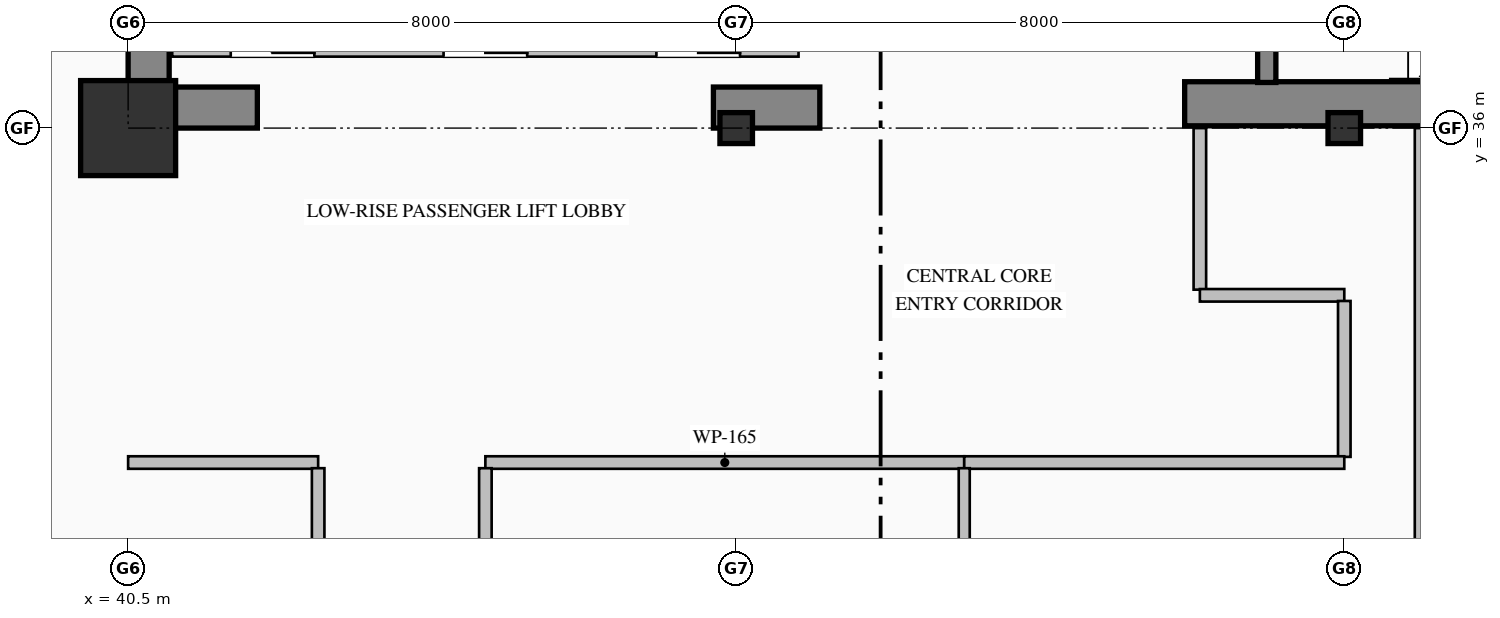
"""IFC4 building model, lengths in metres.
Left out: names, types, materials, properties, quantities, classifications, styles, units other than length and angle.
Written with IfcOpenShell. Run it as: python <this file> out.ifc"""

import sys

from ifc_helpers import new_model, si_unit, direction, frame, frame_2d, origin, origin_2d, place, context, subcontext, project, spatial, rectangle, hollow_rectangle, i_section, extrude, element, save


model = new_model("IFC4")
c1 = context("Model", 3, precision=1e-05, world=origin(), true_north=direction((0.0, 1.0)))
c2 = subcontext(c1, "Body", "Model", "MODEL_VIEW")
j1 = project(units=[si_unit("LENGTHUNIT", "METRE"), si_unit("PLANEANGLEUNIT", "RADIAN")], contexts=[c1])
p1 = place(None, origin())
s1 = spatial("IfcSite", under=j1, at=p1, CompositionType="ELEMENT")
p2 = place(p1, origin())
s2 = spatial("IfcBuilding", under=s1, at=p2, CompositionType="ELEMENT")
p3 = place(p2, frame((0.0, 0.0, 76.2)))
s3 = spatial("IfcBuildingStorey", under=s2, at=p3, CompositionType="ELEMENT", Elevation=76.2)
p4 = place(p3, frame((40.77, 36.54, 0.0), z_axis=(0.0, 0.0, 1.0), x_axis=(0.0, 1.0, 0.0)))
e1 = element("IfcWall", 1, at=p4, inside=s3, PredefinedType="SHEAR", context=c2, shape_type="SweptSolid", body=[
    extrude(rectangle(XDim=7.86, YDim=0.54, at=frame_2d((3.93, 0.0))), origin(), (0.0, 0.0, 1.0), 3.75),
])
p5 = place(p3, frame((40.5, 36.27, 0.0), z_axis=(0.0, 0.0, 1.0), x_axis=(1.0, 0.0, 0.0)))
e2 = element("IfcWall", 2, at=p5, inside=s3, PredefinedType="SHEAR", context=c2, shape_type="SweptSolid", body=[
    extrude(rectangle(XDim=1.7, YDim=0.54, at=frame_2d((0.85, 0.0))), origin(), (0.0, 0.0, 1.0), 3.75),
])
p6 = place(p3, frame((48.2, 36.27, 0.0), z_axis=(0.0, 0.0, 1.0), x_axis=(1.0, 0.0, 0.0)))
e3 = element("IfcWall", 3, at=p6, inside=s3, PredefinedType="SHEAR", context=c2, shape_type="SweptSolid", body=[
    extrude(rectangle(XDim=1.4, YDim=0.54, at=frame_2d((0.7, 0.0))), origin(), (0.0, 0.0, 1.0), 3.75),
])
p7 = place(p3, frame((54.4, 36.32, 0.0), z_axis=(0.0, 0.0, 1.0), x_axis=(1.0, 0.0, 0.0)))
e4 = element("IfcWall", 4, at=p7, inside=s3, PredefinedType="SHEAR", context=c2, shape_type="SweptSolid", body=[
    extrude(rectangle(XDim=9.6, YDim=0.58, at=frame_2d((4.8, 0.0))), origin(), (0.0, 0.0, 1.0), 4.0),
])
p8 = place(p3, frame((40.5, 36.0, 0.0), z_axis=(0.0, 0.0, 1.0), x_axis=(1.0, 0.0, 0.0)))
e5 = element("IfcColumn", 5, at=p8, inside=s3, PredefinedType="COLUMN", context=c2, shape_type="SweptSolid", body=[
    extrude(hollow_rectangle(XDim=1.25, YDim=1.25, WallThickness=0.045, at=origin_2d()), origin(), (0.0, 0.0, 1.0), 4.0),
])
for number, where, z_axis, x_axis in (
    (6, (48.5, 36.0, 0.0), (0.0, 0.0, 1.0), (1.0, 0.0, 0.0)),
    (7, (56.5, 36.0, 0.0), (0.0, 0.0, 1.0), (1.0, 0.0, 0.0)),
):
    element("IfcColumn", number, at=place(p3, frame(where, z_axis=z_axis, x_axis=x_axis)), inside=s3, PredefinedType="COLUMN", context=c2, shape_type="SweptSolid", body=[
        extrude(i_section(OverallWidth=0.407, OverallDepth=0.428, WebThickness=0.02, FlangeThickness=0.035, FilletRadius=0.022, at=origin_2d()), origin(), (0.0, 0.0, 1.0), 4.0),
    ])
p9 = place(p3, frame((55.48, 39.75, 0.0), z_axis=(0.0, 0.0, 1.0), x_axis=(0.0, -1.0, 0.0)))
e8 = element("IfcWall", 8, at=p9, inside=s3, PredefinedType="SOLIDWALL", context=c2, shape_type="SweptSolid", body=[
    extrude(rectangle(XDim=3.15, YDim=0.24, at=frame_2d((1.575, 0.0))), origin(), (0.0, 0.0, 1.0), 4.0),
])
p10 = place(p9, frame((1.0, 0.0, 0.0)))
e9 = element("IfcOpeningElement", 9, at=p10, cuts=e8, PredefinedType="OPENING", context=c2, shape_type="SweptSolid", body=[
    extrude(rectangle(XDim=1.15, YDim=2.2, at=frame_2d((0.575, 1.1))), frame((0.0, 0.13, 0.0), z_axis=(0.0, -1.0, 0.0), x_axis=(1.0, 0.0, 0.0)), (0.0, 0.0, 1.0), 0.26),
])
p11 = place(p3, frame((49.32, 37.05, 0.0), z_axis=(0.0, 0.0, 1.0), x_axis=(-1.0, 0.0, 0.0)))
e10 = element("IfcWall", 10, at=p11, inside=s3, PredefinedType="PARTITIONING", context=c2, shape_type="SweptSolid", body=[
    extrude(rectangle(XDim=8.24, YDim=0.22, at=frame_2d((4.12, 0.0))), origin(), (0.0, 0.0, 1.0), 3.75),
])
p12 = place(p11, frame((6.37, 0.0, 0.0)))
e11 = element("IfcOpeningElement", 11, at=p12, cuts=e10, PredefinedType="OPENING", context=c2, shape_type="SweptSolid", body=[
    extrude(rectangle(XDim=1.1, YDim=2.2, at=frame_2d((0.55, 1.1))), frame((0.0, 0.12, 0.0), z_axis=(0.0, -1.0, 0.0), x_axis=(1.0, 0.0, 0.0)), (0.0, 0.0, 1.0), 0.24),
])
p13 = place(p11, frame((3.57, 0.0, 0.0)))
e12 = element("IfcOpeningElement", 12, at=p13, cuts=e10, PredefinedType="OPENING", context=c2, shape_type="SweptSolid", body=[
    extrude(rectangle(XDim=1.1, YDim=2.2, at=frame_2d((0.55, 1.1))), frame((0.0, 0.12, 0.0), z_axis=(0.0, -1.0, 0.0), x_axis=(1.0, 0.0, 0.0)), (0.0, 0.0, 1.0), 0.24),
])
p14 = place(p11, frame((0.77, 0.0, 0.0)))
e13 = element("IfcOpeningElement", 13, at=p14, cuts=e10, PredefinedType="OPENING", context=c2, shape_type="SweptSolid", body=[
    extrude(rectangle(XDim=1.1, YDim=2.2, at=frame_2d((0.55, 1.1))), frame((0.0, 0.12, 0.0), z_axis=(0.0, -1.0, 0.0), x_axis=(1.0, 0.0, 0.0)), (0.0, 0.0, 1.0), 0.24),
])
p15 = place(p3, frame((51.5, 31.6, 0.0), z_axis=(0.0, 0.0, 1.0), x_axis=(-1.0, 0.0, 0.0)))
e14 = element("IfcWall", 14, at=p15, inside=s3, PredefinedType="PARTITIONING", context=c2, shape_type="SweptSolid", body=[
    extrude(rectangle(XDim=6.3, YDim=0.165, at=frame_2d((3.15, 0.0))), origin(), (0.0, 0.0, 1.0), 3.75),
])
p16 = place(p3, frame((54.6, 36.0, 0.0), z_axis=(0.0, 0.0, 1.0), x_axis=(0.0, -1.0, 0.0)))
e15 = element("IfcWall", 15, at=p16, inside=s3, PredefinedType="PARTITIONING", context=c2, shape_type="SweptSolid", body=[
    extrude(rectangle(XDim=2.125, YDim=0.165, at=frame_2d((1.063, 0.0))), origin(), (0.0, 0.0, 1.0), 3.75),
])
p17 = place(p3, frame((54.6, 33.8, 0.0), z_axis=(0.0, 0.0, 1.0), x_axis=(1.0, 0.0, 0.0)))
e16 = element("IfcWall", 16, at=p17, inside=s3, PredefinedType="PARTITIONING", context=c2, shape_type="SweptSolid", body=[
    extrude(rectangle(XDim=1.9, YDim=0.165, at=frame_2d((0.95, 0.0))), origin(), (0.0, 0.0, 1.0), 3.75),
])
p18 = place(p3, frame((56.5, 33.726, 0.0), z_axis=(0.0, 0.0, 1.0), x_axis=(0.0, -1.0, 0.0)))
e17 = element("IfcWall", 17, at=p18, inside=s3, PredefinedType="PARTITIONING", context=c2, shape_type="SweptSolid", body=[
    extrude(rectangle(XDim=2.051, YDim=0.165, at=frame_2d((1.025, 0.0))), origin(), (0.0, 0.0, 1.0), 3.042),
])
p19 = place(p3, frame((56.5, 31.6, 0.0), z_axis=(0.0, 0.0, 1.0), x_axis=(-1.0, 0.0, 0.0)))
e18 = element("IfcWall", 18, at=p19, inside=s3, PredefinedType="PARTITIONING", context=c2, shape_type="SweptSolid", body=[
    extrude(rectangle(XDim=5.0, YDim=0.165, at=frame_2d((2.5, 0.0))), origin(), (0.0, 0.0, 1.0), 3.75),
])
p20 = place(p3, frame((43.0, 31.6, 0.0), z_axis=(0.0, 0.0, 1.0), x_axis=(-1.0, 0.0, 0.0)))
e19 = element("IfcWall", 19, at=p20, inside=s3, PredefinedType="PARTITIONING", context=c2, shape_type="SweptSolid", body=[
    extrude(rectangle(XDim=2.5, YDim=0.165, at=frame_2d((1.25, 0.0))), origin(), (0.0, 0.0, 1.0), 3.75),
])
p21 = place(p3, frame((45.2, 31.525, 0.0), z_axis=(0.0, 0.0, 1.0), x_axis=(0.0, -1.0, 0.0)))
e20 = element("IfcWall", 20, at=p21, inside=s3, PredefinedType="PARTITIONING", context=c2, shape_type="SweptSolid", body=[
    extrude(rectangle(XDim=16.751, YDim=0.165, at=frame_2d((8.375, 0.0))), origin(), (0.0, 0.0, 1.0), 3.75),
])
p22 = place(p21, frame((7.875, 0.0, 0.0)))
e21 = element("IfcOpeningElement", 21, at=p22, cuts=e20, PredefinedType="OPENING", context=c2, shape_type="SweptSolid", body=[
    extrude(rectangle(XDim=1.0, YDim=2.15, at=frame_2d((0.5, 1.075))), frame((0.0, 0.093, 0.0), z_axis=(0.0, -1.0, 0.0), x_axis=(1.0, 0.0, 0.0)), (0.0, 0.0, 1.0), 0.185),
])
p23 = place(p3, frame((43.0, 22.057, 0.0), z_axis=(0.0, 0.0, 1.0), x_axis=(0.0, 1.0, 0.0)))
e22 = element("IfcWall", 22, at=p23, inside=s3, PredefinedType="PARTITIONING", context=c2, shape_type="SweptSolid", body=[
    extrude(rectangle(XDim=9.469, YDim=0.165, at=frame_2d((4.734, 0.0))), origin(), (0.0, 0.0, 1.0), 3.75),
])
p24 = place(p23, frame((4.234, 0.0, 0.0)))
e23 = element("IfcOpeningElement", 23, at=p24, cuts=e22, PredefinedType="OPENING", context=c2, shape_type="SweptSolid", body=[
    extrude(rectangle(XDim=1.0, YDim=2.15, at=frame_2d((0.5, 1.075))), frame((0.0, 0.093, 0.0), z_axis=(0.0, -1.0, 0.0), x_axis=(1.0, 0.0, 0.0)), (0.0, 0.0, 1.0), 0.185),
])
p25 = place(p3, frame((51.5, 31.525, 0.0), z_axis=(0.0, 0.0, 1.0), x_axis=(0.0, -1.0, 0.0)))
e24 = element("IfcWall", 24, at=p25, inside=s3, PredefinedType="PARTITIONING", context=c2, shape_type="SweptSolid", body=[
    extrude(rectangle(XDim=16.751, YDim=0.145, at=frame_2d((8.375, 0.0))), origin(), (0.0, 0.0, 1.0), 3.75),
])
p26 = place(p3, frame((57.5, 36.0, 0.0), z_axis=(0.0, 0.0, 1.0), x_axis=(0.0, -1.0, 0.0)))
e25 = element("IfcWall", 25, at=p26, inside=s3, PredefinedType="PARTITIONING", context=c2, shape_type="SweptSolid", body=[
    extrude(rectangle(XDim=21.226, YDim=0.145, at=frame_2d((10.613, 0.0))), origin(), (0.0, 0.0, 1.0), 3.75),
])
save(model, sys.argv[1])
